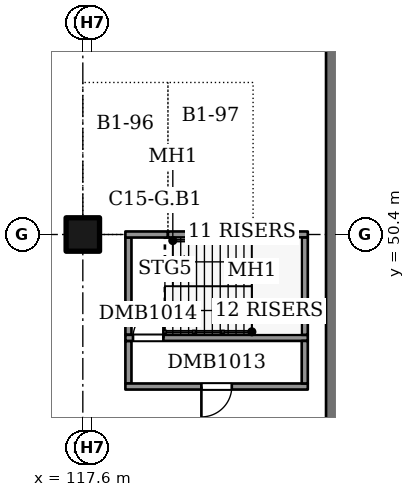
"""IFC4 building model, lengths in metres.
Left out: names, types, materials, properties, quantities, classifications, styles, units other than length and angle.
Written with IfcOpenShell. Run it as: python <this file> out.ifc"""

import sys

from ifc_helpers import new_model, si_unit, direction, frame, frame_2d, origin, origin_2d, place, context, subcontext, project, spatial, rectangle, extrude, element, fill, save


model = new_model("IFC4")
c1 = context("Model", 3, precision=1e-05, world=origin(), true_north=direction((0.0, 1.0)))
c2 = subcontext(c1, "Body", "Model", "MODEL_VIEW")
j1 = project(units=[si_unit("LENGTHUNIT", "METRE"), si_unit("PLANEANGLEUNIT", "RADIAN")], contexts=[c1])
p1 = place(None, origin())
s1 = spatial("IfcSite", under=j1, at=p1, CompositionType="ELEMENT")
p2 = place(p1, origin())
s2 = spatial("IfcBuilding", under=s1, at=p2, CompositionType="ELEMENT")
p3 = place(p2, frame((0.0, 0.0, -4.0)))
s3 = spatial("IfcBuildingStorey", under=s2, at=p3, CompositionType="ELEMENT", Elevation=-4.0)
p4 = place(p3, frame((126.0, 37.4, 0.0), z_axis=(0.0, 0.0, 1.0), x_axis=(0.0, 1.0, 0.0)))
e1 = element("IfcWall", 1, at=p4, inside=s3, PredefinedType="SOLIDWALL", context=c2, shape_type="SweptSolid", body=[
    extrude(rectangle(XDim=63.0, YDim=0.8, at=frame_2d((31.5, 0.0))), origin(), (0.0, 0.0, 1.0), 3.6),
])
p5 = place(p3, frame((117.6, 50.4, 0.0), z_axis=(0.0, 0.0, 1.0), x_axis=(1.0, 0.0, 0.0)))
e2 = element("IfcColumn", 2, at=p5, inside=s3, PredefinedType="COLUMN", context=c2, shape_type="SweptSolid", body=[
    extrude(rectangle(XDim=1.1, YDim=1.1, at=origin_2d()), origin(), (0.0, 0.0, 1.0), 3.6),
])
p6 = place(p3, frame((119.1, 45.5, 0.0), z_axis=(0.0, 0.0, 1.0), x_axis=(0.0, 1.0, 0.0)))
e3 = element("IfcWall", 3, at=p6, inside=s3, PredefinedType="SOLIDWALL", context=c2, shape_type="SweptSolid", body=[
    extrude(rectangle(XDim=1.4, YDim=0.2, at=frame_2d((0.7, 0.0))), origin(), (0.0, 0.0, 1.0), 4.0),
])
p7 = place(p3, frame((119.0, 45.4, 0.0), z_axis=(0.0, 0.0, 1.0), x_axis=(1.0, 0.0, 0.0)))
e4 = element("IfcWall", 4, at=p7, inside=s3, PredefinedType="SOLIDWALL", context=c2, shape_type="SweptSolid", body=[
    extrude(rectangle(XDim=6.0, YDim=0.2, at=frame_2d((3.0, 0.0))), origin(), (0.0, 0.0, 1.0), 4.0),
])
p8 = place(p7, frame((2.5, 0.0, 0.0)))
e5 = element("IfcOpeningElement", 5, at=p8, cuts=e4, PredefinedType="OPENING", context=c2, shape_type="SweptSolid", body=[
    extrude(rectangle(XDim=1.0, YDim=2.1, at=frame_2d((0.5, 1.05))), frame((0.0, 0.11, 0.0), z_axis=(0.0, -1.0, 0.0), x_axis=(1.0, 0.0, 0.0)), (0.0, 0.0, 1.0), 0.22),
])
p9 = place(p3, frame((119.1, 47.1, 0.0), z_axis=(0.0, 0.0, 1.0), x_axis=(0.0, 1.0, 0.0)))
e6 = element("IfcWall", 6, at=p9, inside=s3, PredefinedType="SOLIDWALL", context=c2, shape_type="SweptSolid", body=[
    extrude(rectangle(XDim=3.2, YDim=0.2, at=frame_2d((1.6, 0.0))), origin(), (0.0, 0.0, 1.0), 4.0),
])
p10 = place(p3, frame((119.0, 47.0, 0.0), z_axis=(0.0, 0.0, 1.0), x_axis=(1.0, 0.0, 0.0)))
e7 = element("IfcWall", 7, at=p10, inside=s3, PredefinedType="SOLIDWALL", context=c2, shape_type="SweptSolid", body=[
    extrude(rectangle(XDim=6.0, YDim=0.2, at=frame_2d((3.0, 0.0))), origin(), (0.0, 0.0, 1.0), 4.0),
])
p11 = place(p10, frame((0.25, 0.0, 0.0)))
e8 = element("IfcOpeningElement", 8, at=p11, cuts=e7, PredefinedType="OPENING", context=c2, shape_type="SweptSolid", body=[
    extrude(rectangle(XDim=1.0, YDim=2.1, at=frame_2d((0.5, 1.05))), frame((0.0, 0.11, 0.0), z_axis=(0.0, -1.0, 0.0), x_axis=(1.0, 0.0, 0.0)), (0.0, 0.0, 1.0), 0.22),
])
p12 = place(p3, frame((119.0, 50.4, 0.0), z_axis=(0.0, 0.0, 1.0), x_axis=(1.0, 0.0, 0.0)))
e9 = element("IfcWall", 9, at=p12, inside=s3, PredefinedType="SOLIDWALL", context=c2, shape_type="SweptSolid", body=[
    extrude(rectangle(XDim=1.4, YDim=0.2, at=frame_2d((0.7, 0.0))), origin(), (0.0, 0.0, 1.0), 4.0),
])
p13 = place(p3, frame((120.4, 50.4, 0.0), z_axis=(0.0, 0.0, 1.0), x_axis=(1.0, 0.0, 0.0)))
e10 = element("IfcWall", 10, at=p13, inside=s3, PredefinedType="SOLIDWALL", context=c2, shape_type="SweptSolid", body=[
    extrude(rectangle(XDim=2.8, YDim=0.2, at=frame_2d((1.4, 0.0))), origin(), (0.0, 0.0, 1.0), 4.0),
])
p14 = place(p3, frame((123.2, 50.4, 0.0), z_axis=(0.0, 0.0, 1.0), x_axis=(1.0, 0.0, 0.0)))
e11 = element("IfcWall", 11, at=p14, inside=s3, PredefinedType="SOLIDWALL", context=c2, shape_type="SweptSolid", body=[
    extrude(rectangle(XDim=1.8, YDim=0.2, at=frame_2d((0.9, 0.0))), origin(), (0.0, 0.0, 1.0), 4.0),
])
p15 = place(p3, frame((124.9, 45.5, 0.0), z_axis=(0.0, 0.0, 1.0), x_axis=(0.0, 1.0, 0.0)))
e12 = element("IfcWall", 12, at=p15, inside=s3, PredefinedType="SOLIDWALL", context=c2, shape_type="SweptSolid", body=[
    extrude(rectangle(XDim=1.4, YDim=0.2, at=frame_2d((0.7, 0.0))), origin(), (0.0, 0.0, 1.0), 4.0),
])
p16 = place(p3, frame((124.9, 47.1, 0.0), z_axis=(0.0, 0.0, 1.0), x_axis=(0.0, 1.0, 0.0)))
e13 = element("IfcWall", 13, at=p16, inside=s3, PredefinedType="SOLIDWALL", context=c2, shape_type="SweptSolid", body=[
    extrude(rectangle(XDim=3.2, YDim=0.2, at=frame_2d((1.6, 0.0))), origin(), (0.0, 0.0, 1.0), 4.0),
])
p17 = place(p8, frame((1.0, 0.0, 0.0), z_axis=(0.0, 0.0, 1.0), x_axis=(-1.0, 0.0, 0.0)))
e14 = element("IfcDoor", 14, at=p17, inside=s3, OperationType="SINGLE_SWING_RIGHT", PredefinedType="DOOR", context=c2, shape_type="SweptSolid", body=[
    extrude(rectangle(XDim=1.0, YDim=2.1, at=frame_2d((0.5, 1.05))), frame((0.0, 0.025, 0.0), z_axis=(0.0, -1.0, 0.0), x_axis=(1.0, 0.0, 0.0)), (0.0, 0.0, 1.0), 0.05),
])
fill(e5, e14)
p18 = place(p11, origin())
e15 = element("IfcDoor", 15, at=p18, inside=s3, OperationType="SINGLE_SWING_RIGHT", PredefinedType="DOOR", context=c2, shape_type="SweptSolid", body=[
    extrude(rectangle(XDim=1.0, YDim=2.1, at=frame_2d((0.5, 1.05))), frame((0.0, 0.025, 0.0), z_axis=(0.0, -1.0, 0.0), x_axis=(1.0, 0.0, 0.0)), (0.0, 0.0, 1.0), 0.05),
])
fill(e8, e15)
save(model, sys.argv[1])
